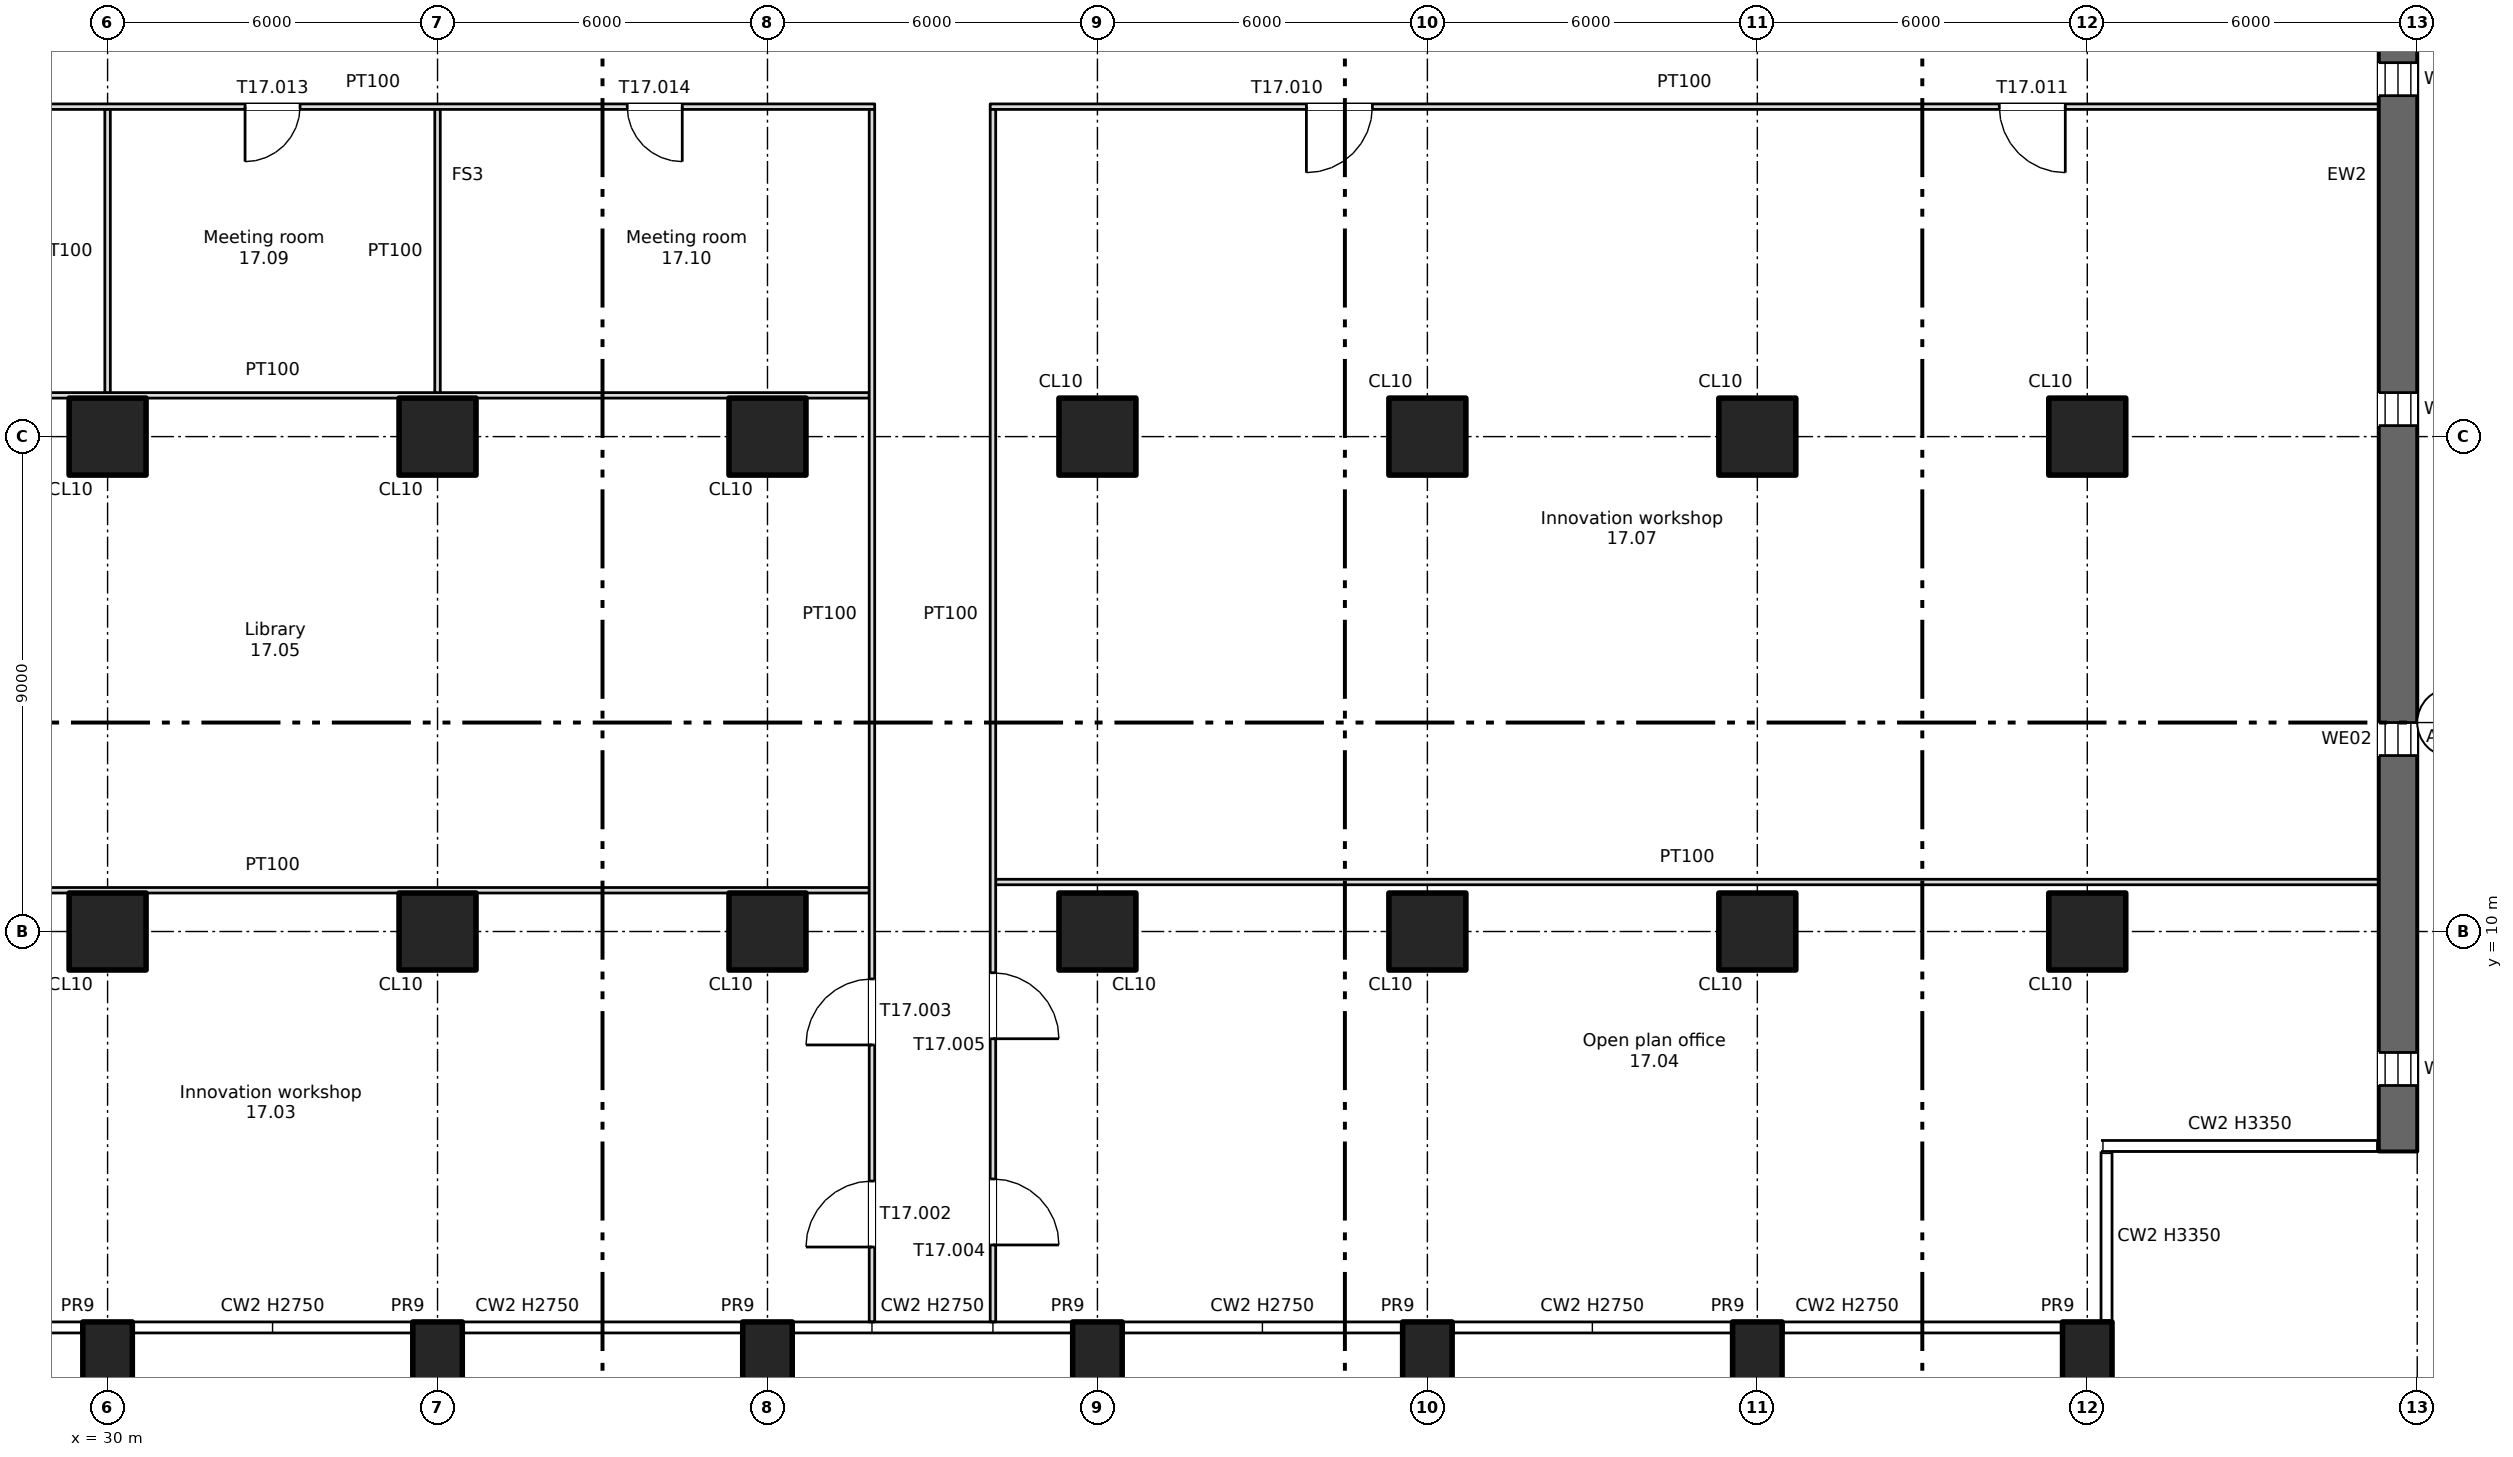
"""IFC4 building model, lengths in metres.
Left out: names, types, materials, properties, quantities, classifications, styles, units other than length and angle.
Written with IfcOpenShell. Run it as: python <this file> out.ifc"""

import sys

from ifc_helpers import new_model, si_unit, direction, frame, frame_2d, origin, origin_2d, place, context, subcontext, project, spatial, rectangle, extrude, element, fill, save


model = new_model("IFC4")
c1 = context("Model", 3, precision=1e-05, world=origin(), true_north=direction((0.0, 1.0)))
c2 = subcontext(c1, "Body", "Model", "MODEL_VIEW")
j1 = project(units=[si_unit("LENGTHUNIT", "METRE"), si_unit("PLANEANGLEUNIT", "RADIAN")], contexts=[c1])
p1 = place(None, origin())
s1 = spatial("IfcSite", under=j1, at=p1, CompositionType="ELEMENT")
p2 = place(p1, origin())
s2 = spatial("IfcBuilding", under=s1, at=p2, CompositionType="ELEMENT")
p3 = place(p2, frame((0.0, 0.0, 106.25)))
s3 = spatial("IfcBuildingStorey", under=s2, at=p3, CompositionType="ELEMENT", Elevation=106.25)
for number, where, z_axis, x_axis in (
    (1, (30.0, 2.2, -0.4), (0.0, 0.0, 1.0), (1.0, 0.0, 0.0)),
    (2, (36.0, 2.2, -0.4), (0.0, 0.0, 1.0), (1.0, 0.0, 0.0)),
    (3, (42.0, 2.2, -0.4), (0.0, 0.0, 1.0), (1.0, 0.0, 0.0)),
    (4, (48.0, 2.2, -0.4), (0.0, 0.0, 1.0), (1.0, 0.0, 0.0)),
    (5, (54.0, 2.2, -0.4), (0.0, 0.0, 1.0), (1.0, 0.0, 0.0)),
    (6, (60.0, 2.2, -0.4), (0.0, 0.0, 1.0), (1.0, 0.0, 0.0)),
    (7, (66.0, 2.2, -0.4), (0.0, 0.0, 1.0), (1.0, 0.0, 0.0)),
):
    element("IfcColumn", number, at=place(p3, frame(where, z_axis=z_axis, x_axis=x_axis)), inside=s3, PredefinedType="COLUMN", context=c2, shape_type="SweptSolid", body=[
        extrude(rectangle(XDim=0.9, YDim=1.4, at=origin_2d()), origin(), (0.0, 0.0, 1.0), 3.75),
    ])
for number, where, z_axis, x_axis in (
    (8, (30.0, 10.0, 0.0), (0.0, 0.0, 1.0), (1.0, 0.0, 0.0)),
    (9, (30.0, 19.0, 0.0), (0.0, 0.0, 1.0), (1.0, 0.0, 0.0)),
    (10, (36.0, 10.0, 0.0), (0.0, 0.0, 1.0), (1.0, 0.0, 0.0)),
    (11, (36.0, 19.0, 0.0), (0.0, 0.0, 1.0), (1.0, 0.0, 0.0)),
    (12, (42.0, 10.0, 0.0), (0.0, 0.0, 1.0), (1.0, 0.0, 0.0)),
    (13, (42.0, 19.0, 0.0), (0.0, 0.0, 1.0), (1.0, 0.0, 0.0)),
    (14, (48.0, 10.0, 0.0), (0.0, 0.0, 1.0), (1.0, 0.0, 0.0)),
    (15, (48.0, 19.0, 0.0), (0.0, 0.0, 1.0), (1.0, 0.0, 0.0)),
    (16, (54.0, 10.0, 0.0), (0.0, 0.0, 1.0), (1.0, 0.0, 0.0)),
    (17, (54.0, 19.0, 0.0), (0.0, 0.0, 1.0), (1.0, 0.0, 0.0)),
    (18, (60.0, 10.0, 0.0), (0.0, 0.0, 1.0), (1.0, 0.0, 0.0)),
    (19, (60.0, 19.0, 0.0), (0.0, 0.0, 1.0), (1.0, 0.0, 0.0)),
    (20, (66.0, 10.0, 0.0), (0.0, 0.0, 1.0), (1.0, 0.0, 0.0)),
    (21, (66.0, 19.0, 0.0), (0.0, 0.0, 1.0), (1.0, 0.0, 0.0)),
):
    element("IfcColumn", number, at=place(p3, frame(where, z_axis=z_axis, x_axis=x_axis)), inside=s3, PredefinedType="COLUMN", context=c2, shape_type="SweptSolid", body=[
        extrude(rectangle(XDim=1.4, YDim=1.4, at=origin_2d()), origin(), (0.0, 0.0, 1.0), 3.35),
    ])
p4 = place(p3, frame((71.65, 6.0, 0.0), z_axis=(0.0, 0.0, 1.0), x_axis=(0.0, 1.0, 0.0)))
e22 = element("IfcWall", 22, at=p4, inside=s3, PredefinedType="SHEAR", context=c2, shape_type="SweptSolid", body=[
    extrude(rectangle(XDim=35.5, YDim=0.7, at=frame_2d((17.75, 0.0))), origin(), (0.0, 0.0, 1.0), 3.35),
])
p5 = place(p4, frame((1.2, 0.0, 0.6)))
e23 = element("IfcOpeningElement", 23, at=p5, cuts=e22, PredefinedType="OPENING", context=c2, shape_type="SweptSolid", body=[
    extrude(rectangle(XDim=0.6, YDim=2.4, at=frame_2d((0.3, 1.2))), frame((0.0, 0.36, 0.0), z_axis=(0.0, -1.0, 0.0), x_axis=(1.0, 0.0, 0.0)), (0.0, 0.0, 1.0), 0.72),
])
p6 = place(p4, frame((7.2, 0.0, 0.6)))
e24 = element("IfcOpeningElement", 24, at=p6, cuts=e22, PredefinedType="OPENING", context=c2, shape_type="SweptSolid", body=[
    extrude(rectangle(XDim=0.6, YDim=2.4, at=frame_2d((0.3, 1.2))), frame((0.0, 0.36, 0.0), z_axis=(0.0, -1.0, 0.0), x_axis=(1.0, 0.0, 0.0)), (0.0, 0.0, 1.0), 0.72),
])
p7 = place(p4, frame((13.2, 0.0, 0.6)))
e25 = element("IfcOpeningElement", 25, at=p7, cuts=e22, PredefinedType="OPENING", context=c2, shape_type="SweptSolid", body=[
    extrude(rectangle(XDim=0.6, YDim=2.4, at=frame_2d((0.3, 1.2))), frame((0.0, 0.36, 0.0), z_axis=(0.0, -1.0, 0.0), x_axis=(1.0, 0.0, 0.0)), (0.0, 0.0, 1.0), 0.72),
])
p8 = place(p4, frame((19.2, 0.0, 0.6)))
e26 = element("IfcOpeningElement", 26, at=p8, cuts=e22, PredefinedType="OPENING", context=c2, shape_type="SweptSolid", body=[
    extrude(rectangle(XDim=0.6, YDim=2.4, at=frame_2d((0.3, 1.2))), frame((0.0, 0.36, 0.0), z_axis=(0.0, -1.0, 0.0), x_axis=(1.0, 0.0, 0.0)), (0.0, 0.0, 1.0), 0.72),
])
p9 = place(p4, frame((25.2, 0.0, 0.6)))
e27 = element("IfcOpeningElement", 27, at=p9, cuts=e22, PredefinedType="OPENING", context=c2, shape_type="SweptSolid", body=[
    extrude(rectangle(XDim=0.6, YDim=2.4, at=frame_2d((0.3, 1.2))), frame((0.0, 0.36, 0.0), z_axis=(0.0, -1.0, 0.0), x_axis=(1.0, 0.0, 0.0)), (0.0, 0.0, 1.0), 0.72),
])
p10 = place(p4, frame((31.2, 0.0, 0.6)))
e28 = element("IfcOpeningElement", 28, at=p10, cuts=e22, PredefinedType="OPENING", context=c2, shape_type="SweptSolid", body=[
    extrude(rectangle(XDim=0.6, YDim=2.4, at=frame_2d((0.3, 1.2))), frame((0.0, 0.36, 0.0), z_axis=(0.0, -1.0, 0.0), x_axis=(1.0, 0.0, 0.0)), (0.0, 0.0, 1.0), 0.72),
])
p11 = place(p3, frame((22.15, 10.75, 0.0), z_axis=(0.0, 0.0, 1.0), x_axis=(1.0, 0.0, 0.0)))
e29 = element("IfcWall", 29, at=p11, inside=s3, PredefinedType="PARTITIONING", context=c2, shape_type="SweptSolid", body=[
    extrude(rectangle(XDim=21.7, YDim=0.1, at=frame_2d((10.85, 0.0))), origin(), (0.0, 0.0, 1.0), 3.35),
])
p12 = place(p3, frame((46.15, 10.9, 0.0), z_axis=(0.0, 0.0, 1.0), x_axis=(1.0, 0.0, 0.0)))
e30 = element("IfcWall", 30, at=p12, inside=s3, PredefinedType="PARTITIONING", context=c2, shape_type="SweptSolid", body=[
    extrude(rectangle(XDim=25.15, YDim=0.1, at=frame_2d((12.575, 0.0))), origin(), (0.0, 0.0, 1.0), 3.35),
])
p13 = place(p3, frame((22.15, 19.75, 0.0), z_axis=(0.0, 0.0, 1.0), x_axis=(1.0, 0.0, 0.0)))
e31 = element("IfcWall", 31, at=p13, inside=s3, PredefinedType="PARTITIONING", context=c2, shape_type="SweptSolid", body=[
    extrude(rectangle(XDim=21.7, YDim=0.1, at=frame_2d((10.85, 0.0))), origin(), (0.0, 0.0, 1.0), 3.35),
])
p14 = place(p3, frame((22.05, 25.0, 0.0), z_axis=(0.0, 0.0, 1.0), x_axis=(1.0, 0.0, 0.0)))
e32 = element("IfcWall", 32, at=p14, inside=s3, PredefinedType="PARTITIONING", context=c2, shape_type="SweptSolid", body=[
    extrude(rectangle(XDim=21.9, YDim=0.1, at=frame_2d((10.95, 0.0))), origin(), (0.0, 0.0, 1.0), 3.35),
])
p15 = place(p14, frame((3.5, 0.0, 0.0)))
e33 = element("IfcOpeningElement", 33, at=p15, cuts=e32, PredefinedType="OPENING", context=c2, shape_type="SweptSolid", body=[
    extrude(rectangle(XDim=1.0, YDim=2.1, at=frame_2d((0.5, 1.05))), frame((0.0, 0.06, 0.0), z_axis=(0.0, -1.0, 0.0), x_axis=(1.0, 0.0, 0.0)), (0.0, 0.0, 1.0), 0.12),
])
p16 = place(p14, frame((10.45, 0.0, 0.0)))
e34 = element("IfcOpeningElement", 34, at=p16, cuts=e32, PredefinedType="OPENING", context=c2, shape_type="SweptSolid", body=[
    extrude(rectangle(XDim=1.0, YDim=2.1, at=frame_2d((0.5, 1.05))), frame((0.0, 0.06, 0.0), z_axis=(0.0, -1.0, 0.0), x_axis=(1.0, 0.0, 0.0)), (0.0, 0.0, 1.0), 0.12),
])
p17 = place(p14, frame((17.4, 0.0, 0.0)))
e35 = element("IfcOpeningElement", 35, at=p17, cuts=e32, PredefinedType="OPENING", context=c2, shape_type="SweptSolid", body=[
    extrude(rectangle(XDim=1.0, YDim=2.1, at=frame_2d((0.5, 1.05))), frame((0.0, 0.06, 0.0), z_axis=(0.0, -1.0, 0.0), x_axis=(1.0, 0.0, 0.0)), (0.0, 0.0, 1.0), 0.12),
])
p18 = place(p3, frame((46.05, 25.0, 0.0), z_axis=(0.0, 0.0, 1.0), x_axis=(1.0, 0.0, 0.0)))
e36 = element("IfcWall", 36, at=p18, inside=s3, PredefinedType="PARTITIONING", context=c2, shape_type="SweptSolid", body=[
    extrude(rectangle(XDim=25.25, YDim=0.1, at=frame_2d((12.625, 0.0))), origin(), (0.0, 0.0, 1.0), 3.35),
])
p19 = place(p18, frame((5.75, 0.0, 0.0)))
e37 = element("IfcOpeningElement", 37, at=p19, cuts=e36, PredefinedType="OPENING", context=c2, shape_type="SweptSolid", body=[
    extrude(rectangle(XDim=1.2, YDim=2.1, at=frame_2d((0.6, 1.05))), frame((0.0, 0.06, 0.0), z_axis=(0.0, -1.0, 0.0), x_axis=(1.0, 0.0, 0.0)), (0.0, 0.0, 1.0), 0.12),
])
p20 = place(p18, frame((18.35, 0.0, 0.0)))
e38 = element("IfcOpeningElement", 38, at=p20, cuts=e36, PredefinedType="OPENING", context=c2, shape_type="SweptSolid", body=[
    extrude(rectangle(XDim=1.2, YDim=2.1, at=frame_2d((0.6, 1.05))), frame((0.0, 0.06, 0.0), z_axis=(0.0, -1.0, 0.0), x_axis=(1.0, 0.0, 0.0)), (0.0, 0.0, 1.0), 0.12),
])
for number, where, z_axis, x_axis in (
    (39, (30.0, 19.8, 0.0), (0.0, 0.0, 1.0), (0.0, 1.0, 0.0)),
    (40, (36.0, 19.8, 0.0), (0.0, 0.0, 1.0), (0.0, 1.0, 0.0)),
):
    element("IfcWall", number, at=place(p3, frame(where, z_axis=z_axis, x_axis=x_axis)), inside=s3, PredefinedType="PARTITIONING", context=c2, shape_type="SweptSolid", body=[
        extrude(rectangle(XDim=5.15, YDim=0.1, at=frame_2d((2.575, 0.0))), origin(), (0.0, 0.0, 1.0), 3.35),
    ])
p21 = place(p3, frame((43.9, 2.9, 0.0), z_axis=(0.0, 0.0, 1.0), x_axis=(0.0, 1.0, 0.0)))
e41 = element("IfcWall", 41, at=p21, inside=s3, PredefinedType="PARTITIONING", context=c2, shape_type="SweptSolid", body=[
    extrude(rectangle(XDim=22.05, YDim=0.1, at=frame_2d((11.025, 0.0))), origin(), (0.0, 0.0, 1.0), 3.35),
])
p22 = place(p21, frame((1.363, 0.0, 0.0)))
e42 = element("IfcOpeningElement", 42, at=p22, cuts=e41, PredefinedType="OPENING", context=c2, shape_type="SweptSolid", body=[
    extrude(rectangle(XDim=1.2, YDim=2.1, at=frame_2d((0.6, 1.05))), frame((0.0, 0.06, 0.0), z_axis=(0.0, -1.0, 0.0), x_axis=(1.0, 0.0, 0.0)), (0.0, 0.0, 1.0), 0.12),
])
p23 = place(p21, frame((5.038, 0.0, 0.0)))
e43 = element("IfcOpeningElement", 43, at=p23, cuts=e41, PredefinedType="OPENING", context=c2, shape_type="SweptSolid", body=[
    extrude(rectangle(XDim=1.2, YDim=2.1, at=frame_2d((0.6, 1.05))), frame((0.0, 0.06, 0.0), z_axis=(0.0, -1.0, 0.0), x_axis=(1.0, 0.0, 0.0)), (0.0, 0.0, 1.0), 0.12),
])
p24 = place(p3, frame((46.1, 2.9, 0.0), z_axis=(0.0, 0.0, 1.0), x_axis=(0.0, 1.0, 0.0)))
e44 = element("IfcWall", 44, at=p24, inside=s3, PredefinedType="PARTITIONING", context=c2, shape_type="SweptSolid", body=[
    extrude(rectangle(XDim=22.05, YDim=0.1, at=frame_2d((11.025, 0.0))), origin(), (0.0, 0.0, 1.0), 3.35),
])
p25 = place(p24, frame((1.4, 0.0, 0.0)))
e45 = element("IfcOpeningElement", 45, at=p25, cuts=e44, PredefinedType="OPENING", context=c2, shape_type="SweptSolid", body=[
    extrude(rectangle(XDim=1.2, YDim=2.1, at=frame_2d((0.6, 1.05))), frame((0.0, 0.06, 0.0), z_axis=(0.0, -1.0, 0.0), x_axis=(1.0, 0.0, 0.0)), (0.0, 0.0, 1.0), 0.12),
])
p26 = place(p24, frame((5.15, 0.0, 0.0)))
e46 = element("IfcOpeningElement", 46, at=p26, cuts=e44, PredefinedType="OPENING", context=c2, shape_type="SweptSolid", body=[
    extrude(rectangle(XDim=1.2, YDim=2.1, at=frame_2d((0.6, 1.05))), frame((0.0, 0.06, 0.0), z_axis=(0.0, -1.0, 0.0), x_axis=(1.0, 0.0, 0.0)), (0.0, 0.0, 1.0), 0.12),
])
p27 = place(p5, origin())
e47 = element("IfcWindow", 47, at=p27, inside=s3, PartitioningType="SINGLE_PANEL", PredefinedType="WINDOW", context=c2, shape_type="SweptSolid", body=[
    extrude(rectangle(XDim=0.6, YDim=2.4, at=frame_2d((0.3, 1.2))), frame((0.0, 0.03, 0.0), z_axis=(0.0, -1.0, 0.0), x_axis=(1.0, 0.0, 0.0)), (0.0, 0.0, 1.0), 0.06),
])
fill(e23, e47)
p28 = place(p6, origin())
e48 = element("IfcWindow", 48, at=p28, inside=s3, PartitioningType="SINGLE_PANEL", PredefinedType="WINDOW", context=c2, shape_type="SweptSolid", body=[
    extrude(rectangle(XDim=0.6, YDim=2.4, at=frame_2d((0.3, 1.2))), frame((0.0, 0.03, 0.0), z_axis=(0.0, -1.0, 0.0), x_axis=(1.0, 0.0, 0.0)), (0.0, 0.0, 1.0), 0.06),
])
fill(e24, e48)
p29 = place(p7, origin())
e49 = element("IfcWindow", 49, at=p29, inside=s3, PartitioningType="SINGLE_PANEL", PredefinedType="WINDOW", context=c2, shape_type="SweptSolid", body=[
    extrude(rectangle(XDim=0.6, YDim=2.4, at=frame_2d((0.3, 1.2))), frame((0.0, 0.03, 0.0), z_axis=(0.0, -1.0, 0.0), x_axis=(1.0, 0.0, 0.0)), (0.0, 0.0, 1.0), 0.06),
])
fill(e25, e49)
p30 = place(p8, origin())
e50 = element("IfcWindow", 50, at=p30, inside=s3, PartitioningType="SINGLE_PANEL", PredefinedType="WINDOW", context=c2, shape_type="SweptSolid", body=[
    extrude(rectangle(XDim=0.6, YDim=2.4, at=frame_2d((0.3, 1.2))), frame((0.0, 0.03, 0.0), z_axis=(0.0, -1.0, 0.0), x_axis=(1.0, 0.0, 0.0)), (0.0, 0.0, 1.0), 0.06),
])
fill(e26, e50)
p31 = place(p22, origin())
e51 = element("IfcDoor", 51, at=p31, inside=s3, OperationType="SINGLE_SWING_LEFT", PredefinedType="DOOR", context=c2, shape_type="SweptSolid", body=[
    extrude(rectangle(XDim=1.2, YDim=2.1, at=frame_2d((0.6, 1.05))), frame((0.0, 0.025, 0.0), z_axis=(0.0, -1.0, 0.0), x_axis=(1.0, 0.0, 0.0)), (0.0, 0.0, 1.0), 0.05),
])
fill(e42, e51)
p32 = place(p23, origin())
e52 = element("IfcDoor", 52, at=p32, inside=s3, OperationType="SINGLE_SWING_LEFT", PredefinedType="DOOR", context=c2, shape_type="SweptSolid", body=[
    extrude(rectangle(XDim=1.2, YDim=2.1, at=frame_2d((0.6, 1.05))), frame((0.0, 0.025, 0.0), z_axis=(0.0, -1.0, 0.0), x_axis=(1.0, 0.0, 0.0)), (0.0, 0.0, 1.0), 0.05),
])
fill(e43, e52)
p33 = place(p25, origin())
e53 = element("IfcDoor", 53, at=p33, inside=s3, OperationType="SINGLE_SWING_LEFT", PredefinedType="DOOR", context=c2, shape_type="SweptSolid", body=[
    extrude(rectangle(XDim=1.2, YDim=2.1, at=frame_2d((0.6, 1.05))), frame((0.0, 0.025, 0.0), z_axis=(0.0, -1.0, 0.0), x_axis=(1.0, 0.0, 0.0)), (0.0, 0.0, 1.0), 0.05),
])
fill(e45, e53)
p34 = place(p26, origin())
e54 = element("IfcDoor", 54, at=p34, inside=s3, OperationType="SINGLE_SWING_LEFT", PredefinedType="DOOR", context=c2, shape_type="SweptSolid", body=[
    extrude(rectangle(XDim=1.2, YDim=2.1, at=frame_2d((0.6, 1.05))), frame((0.0, 0.025, 0.0), z_axis=(0.0, -1.0, 0.0), x_axis=(1.0, 0.0, 0.0)), (0.0, 0.0, 1.0), 0.05),
])
fill(e46, e54)
p35 = place(p19, origin())
e55 = element("IfcDoor", 55, at=p35, inside=s3, OperationType="SINGLE_SWING_LEFT", PredefinedType="DOOR", context=c2, shape_type="SweptSolid", body=[
    extrude(rectangle(XDim=1.2, YDim=2.1, at=frame_2d((0.6, 1.05))), frame((0.0, 0.025, 0.0), z_axis=(0.0, -1.0, 0.0), x_axis=(1.0, 0.0, 0.0)), (0.0, 0.0, 1.0), 0.05),
])
fill(e37, e55)
p36 = place(p20, origin())
e56 = element("IfcDoor", 56, at=p36, inside=s3, OperationType="SINGLE_SWING_RIGHT", PredefinedType="DOOR", context=c2, shape_type="SweptSolid", body=[
    extrude(rectangle(XDim=1.2, YDim=2.1, at=frame_2d((0.6, 1.05))), frame((0.0, 0.025, 0.0), z_axis=(0.0, -1.0, 0.0), x_axis=(1.0, 0.0, 0.0)), (0.0, 0.0, 1.0), 0.05),
])
fill(e38, e56)
p37 = place(p16, origin())
e57 = element("IfcDoor", 57, at=p37, inside=s3, OperationType="SINGLE_SWING_LEFT", PredefinedType="DOOR", context=c2, shape_type="SweptSolid", body=[
    extrude(rectangle(XDim=1.0, YDim=2.1, at=frame_2d((0.5, 1.05))), frame((0.0, 0.025, 0.0), z_axis=(0.0, -1.0, 0.0), x_axis=(1.0, 0.0, 0.0)), (0.0, 0.0, 1.0), 0.05),
])
fill(e34, e57)
p38 = place(p17, origin())
e58 = element("IfcDoor", 58, at=p38, inside=s3, OperationType="SINGLE_SWING_RIGHT", PredefinedType="DOOR", context=c2, shape_type="SweptSolid", body=[
    extrude(rectangle(XDim=1.0, YDim=2.1, at=frame_2d((0.5, 1.05))), frame((0.0, 0.025, 0.0), z_axis=(0.0, -1.0, 0.0), x_axis=(1.0, 0.0, 0.0)), (0.0, 0.0, 1.0), 0.05),
])
fill(e35, e58)
save(model, sys.argv[1])
